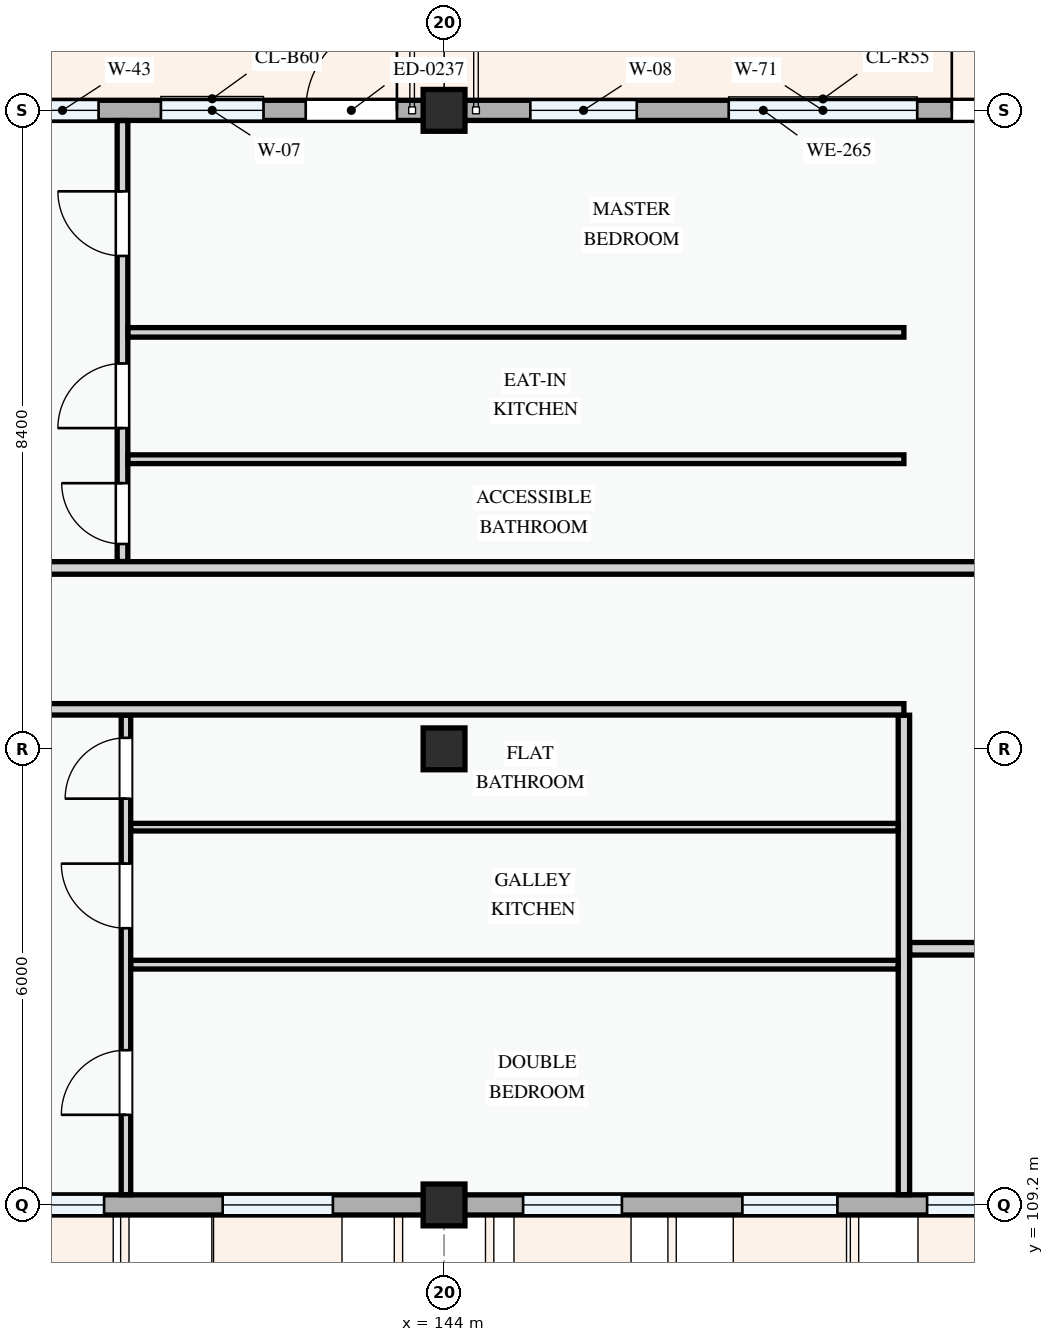
"""IFC4 building model, lengths in metres.
Left out: names, types, materials, properties, quantities, classifications, styles, units other than length and angle.
Written with IfcOpenShell. Run it as: python <this file> out.ifc"""

import sys

from ifc_helpers import new_model, si_unit, direction, frame, frame_2d, origin, origin_2d, place, context, subcontext, project, spatial, rectangle, extrude, element, fill, save


model = new_model("IFC4")
c1 = context("Model", 3, precision=1e-05, world=origin(), true_north=direction((0.0, 1.0)))
c2 = subcontext(c1, "Body", "Model", "MODEL_VIEW")
j1 = project(units=[si_unit("LENGTHUNIT", "METRE"), si_unit("PLANEANGLEUNIT", "RADIAN")], contexts=[c1])
p1 = place(None, origin())
s1 = spatial("IfcSite", under=j1, at=p1, CompositionType="ELEMENT")
p2 = place(p1, origin())
s2 = spatial("IfcBuilding", under=s1, at=p2, CompositionType="ELEMENT")
p3 = place(p2, frame((0.0, 0.0, 31.2)))
s3 = spatial("IfcBuildingStorey", under=s2, at=p3, CompositionType="ELEMENT", Elevation=31.2)
for number, where, z_axis, x_axis in (
    (1, (144.0, 109.2, 0.0), (0.0, 0.0, 1.0), (1.0, 0.0, 0.0)),
    (2, (144.0, 115.2, 0.0), (0.0, 0.0, 1.0), (1.0, 0.0, 0.0)),
    (3, (144.0, 123.6, 0.0), (0.0, 0.0, 1.0), (1.0, 0.0, 0.0)),
):
    element("IfcColumn", number, at=place(p3, frame(where, z_axis=z_axis, x_axis=x_axis)), inside=s3, PredefinedType="COLUMN", context=c2, shape_type="SweptSolid", body=[
        extrude(rectangle(XDim=0.55, YDim=0.55, at=origin_2d()), origin(), (0.0, 0.0, 1.0), 3.3),
    ])
p4 = place(p3, frame((152.4, 123.6, 0.0), z_axis=(0.0, 0.0, 1.0), x_axis=(-1.0, 0.0, 0.0)))
e4 = element("IfcWall", 4, at=p4, inside=s3, PredefinedType="STANDARD", context=c2, shape_type="SweptSolid", body=[
    extrude(rectangle(XDim=8.4, YDim=0.265, at=frame_2d((4.2, 0.0))), origin(), (0.0, 0.0, 1.0), 2.375),
])
p5 = place(p4, frame((0.62, 0.0, 0.0)))
e5 = element("IfcOpeningElement", 5, at=p5, cuts=e4, PredefinedType="OPENING", context=c2, shape_type="SweptSolid", body=[
    extrude(rectangle(XDim=1.1, YDim=2.15, at=frame_2d((0.55, 1.075))), frame((0.0, 0.143, 0.0), z_axis=(0.0, -1.0, 0.0), x_axis=(1.0, 0.0, 0.0)), (0.0, 0.0, 1.0), 0.285),
])
p6 = place(p4, frame((2.175, 0.0, 0.78)))
e6 = element("IfcOpeningElement", 6, at=p6, cuts=e4, PredefinedType="OPENING", context=c2, shape_type="SweptSolid", body=[
    extrude(rectangle(XDim=2.48, YDim=1.46, at=frame_2d((1.24, 0.73))), frame((0.0, 0.143, 0.0), z_axis=(0.0, -1.0, 0.0), x_axis=(1.0, 0.0, 0.0)), (0.0, 0.0, 1.0), 0.285),
])
p7 = place(p4, frame((5.865, 0.0, 0.78)))
e7 = element("IfcOpeningElement", 7, at=p7, cuts=e4, PredefinedType="OPENING", context=c2, shape_type="SweptSolid", body=[
    extrude(rectangle(XDim=1.4, YDim=1.45, at=frame_2d((0.7, 0.725))), frame((0.0, 0.143, 0.0), z_axis=(0.0, -1.0, 0.0), x_axis=(1.0, 0.0, 0.0)), (0.0, 0.0, 1.0), 0.285),
])
p8 = place(p3, frame((144.0, 123.6, 0.0), z_axis=(0.0, 0.0, 1.0), x_axis=(-1.0, 0.0, 0.0)))
e8 = element("IfcWall", 8, at=p8, inside=s3, PredefinedType="STANDARD", context=c2, shape_type="SweptSolid", body=[
    extrude(rectangle(XDim=6.0, YDim=0.265, at=frame_2d((3.0, 0.0))), origin(), (0.0, 0.0, 1.0), 2.525),
])
p9 = place(p8, frame((0.62, 0.0, 0.0)))
e9 = element("IfcOpeningElement", 9, at=p9, cuts=e8, PredefinedType="OPENING", context=c2, shape_type="SweptSolid", body=[
    extrude(rectangle(XDim=1.2, YDim=2.15, at=frame_2d((0.6, 1.075))), frame((0.0, 0.143, 0.0), z_axis=(0.0, -1.0, 0.0), x_axis=(1.0, 0.0, 0.0)), (0.0, 0.0, 1.0), 0.285),
])
p10 = place(p8, frame((2.375, 0.0, 0.78)))
e10 = element("IfcOpeningElement", 10, at=p10, cuts=e8, PredefinedType="OPENING", context=c2, shape_type="SweptSolid", body=[
    extrude(rectangle(XDim=1.35, YDim=1.55, at=frame_2d((0.675, 0.775))), frame((0.0, 0.143, 0.0), z_axis=(0.0, -1.0, 0.0), x_axis=(1.0, 0.0, 0.0)), (0.0, 0.0, 1.0), 0.285),
])
p11 = place(p8, frame((4.545, 0.0, 0.78)))
e11 = element("IfcOpeningElement", 11, at=p11, cuts=e8, PredefinedType="OPENING", context=c2, shape_type="SweptSolid", body=[
    extrude(rectangle(XDim=0.95, YDim=1.15, at=frame_2d((0.475, 0.575))), frame((0.0, 0.143, 0.0), z_axis=(0.0, -1.0, 0.0), x_axis=(1.0, 0.0, 0.0)), (0.0, 0.0, 1.0), 0.285),
])
p12 = place(p3, frame((138.0, 109.2, 0.0), z_axis=(0.0, 0.0, 1.0), x_axis=(1.0, 0.0, 0.0)))
e12 = element("IfcWall", 12, at=p12, inside=s3, PredefinedType="STANDARD", context=c2, shape_type="SweptSolid", body=[
    extrude(rectangle(XDim=6.0, YDim=0.265, at=frame_2d((3.0, 0.0))), origin(), (0.0, 0.0, 1.0), 2.525),
])
p13 = place(p12, frame((0.478, 0.0, 0.78)))
e13 = element("IfcOpeningElement", 13, at=p13, cuts=e12, PredefinedType="OPENING", context=c2, shape_type="SweptSolid", body=[
    extrude(rectangle(XDim=1.05, YDim=1.2, at=frame_2d((0.525, 0.6))), frame((0.0, 0.143, 0.0), z_axis=(0.0, -1.0, 0.0), x_axis=(1.0, 0.0, 0.0)), (0.0, 0.0, 1.0), 0.285),
])
p14 = place(p12, frame((3.087, 0.0, 0.78)))
e14 = element("IfcOpeningElement", 14, at=p14, cuts=e12, PredefinedType="OPENING", context=c2, shape_type="SweptSolid", body=[
    extrude(rectangle(XDim=1.45, YDim=1.6, at=frame_2d((0.725, 0.8))), frame((0.0, 0.143, 0.0), z_axis=(0.0, -1.0, 0.0), x_axis=(1.0, 0.0, 0.0)), (0.0, 0.0, 1.0), 0.285),
])
p15 = place(p3, frame((144.0, 109.2, 0.0), z_axis=(0.0, 0.0, 1.0), x_axis=(1.0, 0.0, 0.0)))
e15 = element("IfcWall", 15, at=p15, inside=s3, PredefinedType="STANDARD", context=c2, shape_type="SweptSolid", body=[
    extrude(rectangle(XDim=8.4, YDim=0.265, at=frame_2d((4.2, 0.0))), origin(), (0.0, 0.0, 1.0), 2.375),
])
p16 = place(p15, frame((1.04, 0.0, 0.78)))
e16 = element("IfcOpeningElement", 16, at=p16, cuts=e15, PredefinedType="OPENING", context=c2, shape_type="SweptSolid", body=[
    extrude(rectangle(XDim=1.3, YDim=1.4, at=frame_2d((0.65, 0.7))), frame((0.0, 0.143, 0.0), z_axis=(0.0, -1.0, 0.0), x_axis=(1.0, 0.0, 0.0)), (0.0, 0.0, 1.0), 0.285),
])
p17 = place(p15, frame((3.925, 0.0, 0.78)))
e17 = element("IfcOpeningElement", 17, at=p17, cuts=e15, PredefinedType="OPENING", context=c2, shape_type="SweptSolid", body=[
    extrude(rectangle(XDim=1.25, YDim=1.3, at=frame_2d((0.625, 0.65))), frame((0.0, 0.143, 0.0), z_axis=(0.0, -1.0, 0.0), x_axis=(1.0, 0.0, 0.0)), (0.0, 0.0, 1.0), 0.285),
])
p18 = place(p15, frame((6.355, 0.0, 0.78)))
e18 = element("IfcOpeningElement", 18, at=p18, cuts=e15, PredefinedType="OPENING", context=c2, shape_type="SweptSolid", body=[
    extrude(rectangle(XDim=1.55, YDim=1.4, at=frame_2d((0.775, 0.7))), frame((0.0, 0.143, 0.0), z_axis=(0.0, -1.0, 0.0), x_axis=(1.0, 0.0, 0.0)), (0.0, 0.0, 1.0), 0.285),
])
p19 = place(p3, frame((150.05, 109.334, 0.0), z_axis=(0.0, 0.0, 1.0), x_axis=(0.0, 1.0, 0.0)))
e19 = element("IfcWall", 19, at=p19, inside=s3, PredefinedType="PARTITIONING", context=c2, shape_type="SweptSolid", body=[
    extrude(rectangle(XDim=6.309, YDim=0.15, at=frame_2d((3.154, 0.0))), origin(), (0.0, 0.0, 1.0), 3.0),
])
p20 = place(p3, frame((150.127, 112.57, 0.0), z_axis=(0.0, 0.0, 1.0), x_axis=(1.0, 0.0, 0.0)))
e20 = element("IfcWall", 20, at=p20, inside=s3, PredefinedType="PARTITIONING", context=c2, shape_type="SweptSolid", body=[
    extrude(rectangle(XDim=2.413, YDim=0.165, at=frame_2d((1.207, 0.0))), origin(), (0.0, 0.0, 1.0), 3.0),
])
p21 = place(p3, frame((139.815, 109.334, 0.0), z_axis=(0.0, 0.0, 1.0), x_axis=(0.0, 1.0, 0.0)))
e21 = element("IfcWall", 21, at=p21, inside=s3, PredefinedType="PARTITIONING", context=c2, shape_type="SweptSolid", body=[
    extrude(rectangle(XDim=6.309, YDim=0.125, at=frame_2d((3.154, 0.0))), origin(), (0.0, 0.0, 1.0), 3.0),
])
p22 = place(p21, frame((1.051, 0.0, 0.0)))
e22 = element("IfcOpeningElement", 22, at=p22, cuts=e21, PredefinedType="OPENING", context=c2, shape_type="SweptSolid", body=[
    extrude(rectangle(XDim=0.85, YDim=2.1, at=frame_2d((0.425, 1.05))), frame((0.0, 0.073, 0.0), z_axis=(0.0, -1.0, 0.0), x_axis=(1.0, 0.0, 0.0)), (0.0, 0.0, 1.0), 0.145),
])
p23 = place(p21, frame((3.506, 0.0, 0.0)))
e23 = element("IfcOpeningElement", 23, at=p23, cuts=e21, PredefinedType="OPENING", context=c2, shape_type="SweptSolid", body=[
    extrude(rectangle(XDim=0.85, YDim=2.1, at=frame_2d((0.425, 1.05))), frame((0.0, 0.073, 0.0), z_axis=(0.0, -1.0, 0.0), x_axis=(1.0, 0.0, 0.0)), (0.0, 0.0, 1.0), 0.145),
])
p24 = place(p21, frame((5.21, 0.0, 0.0)))
e24 = element("IfcOpeningElement", 24, at=p24, cuts=e21, PredefinedType="OPENING", context=c2, shape_type="SweptSolid", body=[
    extrude(rectangle(XDim=0.8, YDim=2.1, at=frame_2d((0.4, 1.05))), frame((0.0, 0.073, 0.0), z_axis=(0.0, -1.0, 0.0), x_axis=(1.0, 0.0, 0.0)), (0.0, 0.0, 1.0), 0.145),
])
p25 = place(p3, frame((139.879, 112.361, 0.0), z_axis=(0.0, 0.0, 1.0), x_axis=(1.0, 0.0, 0.0)))
e25 = element("IfcWall", 25, at=p25, inside=s3, PredefinedType="PARTITIONING", context=c2, shape_type="SweptSolid", body=[
    extrude(rectangle(XDim=10.094, YDim=0.115, at=frame_2d((5.047, 0.0))), origin(), (0.0, 0.0, 1.0), 3.0),
])
p26 = place(p3, frame((139.879, 114.17, 0.0), z_axis=(0.0, 0.0, 1.0), x_axis=(1.0, 0.0, 0.0)))
e26 = element("IfcWall", 26, at=p26, inside=s3, PredefinedType="PARTITIONING", context=c2, shape_type="SweptSolid", body=[
    extrude(rectangle(XDim=10.094, YDim=0.1, at=frame_2d((5.047, 0.0))), origin(), (0.0, 0.0, 1.0), 3.0),
])
p27 = place(p3, frame((139.77, 117.665, 0.0), z_axis=(0.0, 0.0, 1.0), x_axis=(0.0, 1.0, 0.0)))
e27 = element("IfcWall", 27, at=p27, inside=s3, PredefinedType="PARTITIONING", context=c2, shape_type="SweptSolid", body=[
    extrude(rectangle(XDim=5.801, YDim=0.14, at=frame_2d((2.9, 0.0))), origin(), (0.0, 0.0, 1.0), 3.0),
])
p28 = place(p27, frame((0.231, 0.0, 0.0)))
e28 = element("IfcOpeningElement", 28, at=p28, cuts=e27, PredefinedType="OPENING", context=c2, shape_type="SweptSolid", body=[
    extrude(rectangle(XDim=0.8, YDim=2.1, at=frame_2d((0.4, 1.05))), frame((0.0, 0.08, 0.0), z_axis=(0.0, -1.0, 0.0), x_axis=(1.0, 0.0, 0.0)), (0.0, 0.0, 1.0), 0.16),
])
p29 = place(p27, frame((1.755, 0.0, 0.0)))
e29 = element("IfcOpeningElement", 29, at=p29, cuts=e27, PredefinedType="OPENING", context=c2, shape_type="SweptSolid", body=[
    extrude(rectangle(XDim=0.85, YDim=2.1, at=frame_2d((0.425, 1.05))), frame((0.0, 0.08, 0.0), z_axis=(0.0, -1.0, 0.0), x_axis=(1.0, 0.0, 0.0)), (0.0, 0.0, 1.0), 0.16),
])
p30 = place(p27, frame((4.02, 0.0, 0.0)))
e30 = element("IfcOpeningElement", 30, at=p30, cuts=e27, PredefinedType="OPENING", context=c2, shape_type="SweptSolid", body=[
    extrude(rectangle(XDim=0.85, YDim=2.1, at=frame_2d((0.425, 1.05))), frame((0.0, 0.08, 0.0), z_axis=(0.0, -1.0, 0.0), x_axis=(1.0, 0.0, 0.0)), (0.0, 0.0, 1.0), 0.16),
])
p31 = place(p3, frame((139.842, 120.679, 0.0), z_axis=(0.0, 0.0, 1.0), x_axis=(1.0, 0.0, 0.0)))
e31 = element("IfcWall", 31, at=p31, inside=s3, PredefinedType="PARTITIONING", context=c2, shape_type="SweptSolid", body=[
    extrude(rectangle(XDim=10.208, YDim=0.125, at=frame_2d((5.104, 0.0))), origin(), (0.0, 0.0, 1.0), 3.0),
])
p32 = place(p3, frame((139.842, 119.01, 0.0), z_axis=(0.0, 0.0, 1.0), x_axis=(1.0, 0.0, 0.0)))
e32 = element("IfcWall", 32, at=p32, inside=s3, PredefinedType="PARTITIONING", context=c2, shape_type="SweptSolid", body=[
    extrude(rectangle(XDim=10.208, YDim=0.115, at=frame_2d((5.104, 0.0))), origin(), (0.0, 0.0, 1.0), 3.0),
])
p33 = place(p3, frame((80.534, 115.72, 0.0), z_axis=(0.0, 0.0, 1.0), x_axis=(1.0, 0.0, 0.0)))
e33 = element("IfcWall", 33, at=p33, inside=s3, PredefinedType="PARTITIONING", context=c2, shape_type="SweptSolid", body=[
    extrude(rectangle(XDim=69.516, YDim=0.15, at=frame_2d((34.758, 0.0))), origin(), (0.0, 0.0, 1.0), 3.0),
])
p34 = place(p33, frame((9.573, 0.0, 0.0)))
e34 = element("IfcOpeningElement", 34, at=p34, cuts=e33, PredefinedType="OPENING", context=c2, shape_type="SweptSolid", body=[
    extrude(rectangle(XDim=0.96, YDim=2.12, at=frame_2d((0.48, 1.06))), frame((0.0, 0.085, 0.0), z_axis=(0.0, -1.0, 0.0), x_axis=(1.0, 0.0, 0.0)), (0.0, 0.0, 1.0), 0.17),
])
p35 = place(p33, frame((23.835, 0.0, 0.0)))
e35 = element("IfcOpeningElement", 35, at=p35, cuts=e33, PredefinedType="OPENING", context=c2, shape_type="SweptSolid", body=[
    extrude(rectangle(XDim=0.92, YDim=2.1, at=frame_2d((0.46, 1.05))), frame((0.0, 0.085, 0.0), z_axis=(0.0, -1.0, 0.0), x_axis=(1.0, 0.0, 0.0)), (0.0, 0.0, 1.0), 0.17),
])
p36 = place(p33, frame((52.783, 0.0, 0.0)))
e36 = element("IfcOpeningElement", 36, at=p36, cuts=e33, PredefinedType="OPENING", context=c2, shape_type="SweptSolid", body=[
    extrude(rectangle(XDim=0.92, YDim=2.1, at=frame_2d((0.46, 1.05))), frame((0.0, 0.085, 0.0), z_axis=(0.0, -1.0, 0.0), x_axis=(1.0, 0.0, 0.0)), (0.0, 0.0, 1.0), 0.17),
])
p37 = place(p3, frame((80.534, 117.58, 0.0), z_axis=(0.0, 0.0, 1.0), x_axis=(1.0, 0.0, 0.0)))
e37 = element("IfcWall", 37, at=p37, inside=s3, PredefinedType="PARTITIONING", context=c2, shape_type="SweptSolid", body=[
    extrude(rectangle(XDim=72.006, YDim=0.165, at=frame_2d((36.003, 0.0))), origin(), (0.0, 0.0, 1.0), 3.0),
])
p38 = place(p37, frame((9.454, 0.0, 0.0)))
e38 = element("IfcOpeningElement", 38, at=p38, cuts=e37, PredefinedType="OPENING", context=c2, shape_type="SweptSolid", body=[
    extrude(rectangle(XDim=0.92, YDim=2.1, at=frame_2d((0.46, 1.05))), frame((0.0, 0.093, 0.0), z_axis=(0.0, -1.0, 0.0), x_axis=(1.0, 0.0, 0.0)), (0.0, 0.0, 1.0), 0.185),
])
p39 = place(p37, frame((23.835, 0.0, 0.0)))
e39 = element("IfcOpeningElement", 39, at=p39, cuts=e37, PredefinedType="OPENING", context=c2, shape_type="SweptSolid", body=[
    extrude(rectangle(XDim=0.92, YDim=2.1, at=frame_2d((0.46, 1.05))), frame((0.0, 0.093, 0.0), z_axis=(0.0, -1.0, 0.0), x_axis=(1.0, 0.0, 0.0)), (0.0, 0.0, 1.0), 0.185),
])
p40 = place(p37, frame((52.76, 0.0, 0.0)))
e40 = element("IfcOpeningElement", 40, at=p40, cuts=e37, PredefinedType="OPENING", context=c2, shape_type="SweptSolid", body=[
    extrude(rectangle(XDim=0.96, YDim=2.12, at=frame_2d((0.48, 1.06))), frame((0.0, 0.093, 0.0), z_axis=(0.0, -1.0, 0.0), x_axis=(1.0, 0.0, 0.0)), (0.0, 0.0, 1.0), 0.185),
])
p41 = place(p5, frame((1.1, 0.0, 0.0), z_axis=(0.0, 0.0, 1.0), x_axis=(-1.0, 0.0, 0.0)))
e41 = element("IfcDoor", 41, at=p41, inside=s3, OperationType="SINGLE_SWING_LEFT", PredefinedType="DOOR", context=c2, shape_type="SweptSolid", body=[
    extrude(rectangle(XDim=1.1, YDim=2.15, at=frame_2d((0.55, 1.075))), frame((0.0, 0.025, 0.0), z_axis=(0.0, -1.0, 0.0), x_axis=(1.0, 0.0, 0.0)), (0.0, 0.0, 1.0), 0.05),
])
fill(e5, e41)
p42 = place(p6, origin())
e42 = element("IfcWindow", 42, at=p42, inside=s3, PartitioningType="DOUBLE_PANEL_VERTICAL", PredefinedType="WINDOW", context=c2, shape_type="SweptSolid", body=[
    extrude(rectangle(XDim=2.48, YDim=1.46, at=frame_2d((1.24, 0.73))), frame((0.0, 0.03, 0.0), z_axis=(0.0, -1.0, 0.0), x_axis=(1.0, 0.0, 0.0)), (0.0, 0.0, 1.0), 0.06),
])
fill(e6, e42)
p43 = place(p7, origin())
e43 = element("IfcWindow", 43, at=p43, inside=s3, PartitioningType="SINGLE_PANEL", PredefinedType="WINDOW", context=c2, shape_type="SweptSolid", body=[
    extrude(rectangle(XDim=1.4, YDim=1.45, at=frame_2d((0.7, 0.725))), frame((0.0, 0.03, 0.0), z_axis=(0.0, -1.0, 0.0), x_axis=(1.0, 0.0, 0.0)), (0.0, 0.0, 1.0), 0.06),
])
fill(e7, e43)
p44 = place(p9, frame((1.2, 0.0, 0.0), z_axis=(0.0, 0.0, 1.0), x_axis=(-1.0, 0.0, 0.0)))
e44 = element("IfcDoor", 44, at=p44, inside=s3, OperationType="SINGLE_SWING_RIGHT", PredefinedType="DOOR", context=c2, shape_type="SweptSolid", body=[
    extrude(rectangle(XDim=1.2, YDim=2.15, at=frame_2d((0.6, 1.075))), frame((0.0, 0.025, 0.0), z_axis=(0.0, -1.0, 0.0), x_axis=(1.0, 0.0, 0.0)), (0.0, 0.0, 1.0), 0.05),
])
fill(e9, e44)
p45 = place(p10, origin())
e45 = element("IfcWindow", 45, at=p45, inside=s3, PartitioningType="SINGLE_PANEL", PredefinedType="WINDOW", context=c2, shape_type="SweptSolid", body=[
    extrude(rectangle(XDim=1.35, YDim=1.55, at=frame_2d((0.675, 0.775))), frame((0.0, 0.03, 0.0), z_axis=(0.0, -1.0, 0.0), x_axis=(1.0, 0.0, 0.0)), (0.0, 0.0, 1.0), 0.06),
])
fill(e10, e45)
p46 = place(p11, origin())
e46 = element("IfcWindow", 46, at=p46, inside=s3, PartitioningType="SINGLE_PANEL", PredefinedType="WINDOW", context=c2, shape_type="SweptSolid", body=[
    extrude(rectangle(XDim=0.95, YDim=1.15, at=frame_2d((0.475, 0.575))), frame((0.0, 0.03, 0.0), z_axis=(0.0, -1.0, 0.0), x_axis=(1.0, 0.0, 0.0)), (0.0, 0.0, 1.0), 0.06),
])
fill(e11, e46)
p47 = place(p13, origin())
e47 = element("IfcWindow", 47, at=p47, inside=s3, PartitioningType="SINGLE_PANEL", PredefinedType="WINDOW", context=c2, shape_type="SweptSolid", body=[
    extrude(rectangle(XDim=1.05, YDim=1.2, at=frame_2d((0.525, 0.6))), frame((0.0, 0.03, 0.0), z_axis=(0.0, -1.0, 0.0), x_axis=(1.0, 0.0, 0.0)), (0.0, 0.0, 1.0), 0.06),
])
fill(e13, e47)
p48 = place(p14, origin())
e48 = element("IfcWindow", 48, at=p48, inside=s3, PartitioningType="SINGLE_PANEL", PredefinedType="WINDOW", context=c2, shape_type="SweptSolid", body=[
    extrude(rectangle(XDim=1.45, YDim=1.6, at=frame_2d((0.725, 0.8))), frame((0.0, 0.03, 0.0), z_axis=(0.0, -1.0, 0.0), x_axis=(1.0, 0.0, 0.0)), (0.0, 0.0, 1.0), 0.06),
])
fill(e14, e48)
p49 = place(p16, origin())
e49 = element("IfcWindow", 49, at=p49, inside=s3, PartitioningType="SINGLE_PANEL", PredefinedType="WINDOW", context=c2, shape_type="SweptSolid", body=[
    extrude(rectangle(XDim=1.3, YDim=1.4, at=frame_2d((0.65, 0.7))), frame((0.0, 0.03, 0.0), z_axis=(0.0, -1.0, 0.0), x_axis=(1.0, 0.0, 0.0)), (0.0, 0.0, 1.0), 0.06),
])
fill(e16, e49)
p50 = place(p17, origin())
e50 = element("IfcWindow", 50, at=p50, inside=s3, PartitioningType="SINGLE_PANEL", PredefinedType="WINDOW", context=c2, shape_type="SweptSolid", body=[
    extrude(rectangle(XDim=1.25, YDim=1.3, at=frame_2d((0.625, 0.65))), frame((0.0, 0.03, 0.0), z_axis=(0.0, -1.0, 0.0), x_axis=(1.0, 0.0, 0.0)), (0.0, 0.0, 1.0), 0.06),
])
fill(e17, e50)
p51 = place(p18, origin())
e51 = element("IfcWindow", 51, at=p51, inside=s3, PartitioningType="SINGLE_PANEL", PredefinedType="WINDOW", context=c2, shape_type="SweptSolid", body=[
    extrude(rectangle(XDim=1.55, YDim=1.4, at=frame_2d((0.775, 0.7))), frame((0.0, 0.03, 0.0), z_axis=(0.0, -1.0, 0.0), x_axis=(1.0, 0.0, 0.0)), (0.0, 0.0, 1.0), 0.06),
])
fill(e18, e51)
p52 = place(p22, origin())
e52 = element("IfcDoor", 52, at=p52, inside=s3, OperationType="SINGLE_SWING_LEFT", PredefinedType="DOOR", context=c2, shape_type="SweptSolid", body=[
    extrude(rectangle(XDim=0.85, YDim=2.1, at=frame_2d((0.425, 1.05))), frame((0.0, 0.025, 0.0), z_axis=(0.0, -1.0, 0.0), x_axis=(1.0, 0.0, 0.0)), (0.0, 0.0, 1.0), 0.05),
])
fill(e22, e52)
p53 = place(p23, origin())
e53 = element("IfcDoor", 53, at=p53, inside=s3, OperationType="SINGLE_SWING_RIGHT", PredefinedType="DOOR", context=c2, shape_type="SweptSolid", body=[
    extrude(rectangle(XDim=0.85, YDim=2.1, at=frame_2d((0.425, 1.05))), frame((0.0, 0.025, 0.0), z_axis=(0.0, -1.0, 0.0), x_axis=(1.0, 0.0, 0.0)), (0.0, 0.0, 1.0), 0.05),
])
fill(e23, e53)
p54 = place(p24, origin())
e54 = element("IfcDoor", 54, at=p54, inside=s3, OperationType="SINGLE_SWING_LEFT", PredefinedType="DOOR", context=c2, shape_type="SweptSolid", body=[
    extrude(rectangle(XDim=0.8, YDim=2.1, at=frame_2d((0.4, 1.05))), frame((0.0, 0.025, 0.0), z_axis=(0.0, -1.0, 0.0), x_axis=(1.0, 0.0, 0.0)), (0.0, 0.0, 1.0), 0.05),
])
fill(e24, e54)
p55 = place(p28, origin())
e55 = element("IfcDoor", 55, at=p55, inside=s3, OperationType="SINGLE_SWING_RIGHT", PredefinedType="DOOR", context=c2, shape_type="SweptSolid", body=[
    extrude(rectangle(XDim=0.8, YDim=2.1, at=frame_2d((0.4, 1.05))), frame((0.0, 0.025, 0.0), z_axis=(0.0, -1.0, 0.0), x_axis=(1.0, 0.0, 0.0)), (0.0, 0.0, 1.0), 0.05),
])
fill(e28, e55)
p56 = place(p29, origin())
e56 = element("IfcDoor", 56, at=p56, inside=s3, OperationType="SINGLE_SWING_LEFT", PredefinedType="DOOR", context=c2, shape_type="SweptSolid", body=[
    extrude(rectangle(XDim=0.85, YDim=2.1, at=frame_2d((0.425, 1.05))), frame((0.0, 0.025, 0.0), z_axis=(0.0, -1.0, 0.0), x_axis=(1.0, 0.0, 0.0)), (0.0, 0.0, 1.0), 0.05),
])
fill(e29, e56)
p57 = place(p30, origin())
e57 = element("IfcDoor", 57, at=p57, inside=s3, OperationType="SINGLE_SWING_RIGHT", PredefinedType="DOOR", context=c2, shape_type="SweptSolid", body=[
    extrude(rectangle(XDim=0.85, YDim=2.1, at=frame_2d((0.425, 1.05))), frame((0.0, 0.025, 0.0), z_axis=(0.0, -1.0, 0.0), x_axis=(1.0, 0.0, 0.0)), (0.0, 0.0, 1.0), 0.05),
])
fill(e30, e57)
save(model, sys.argv[1])
